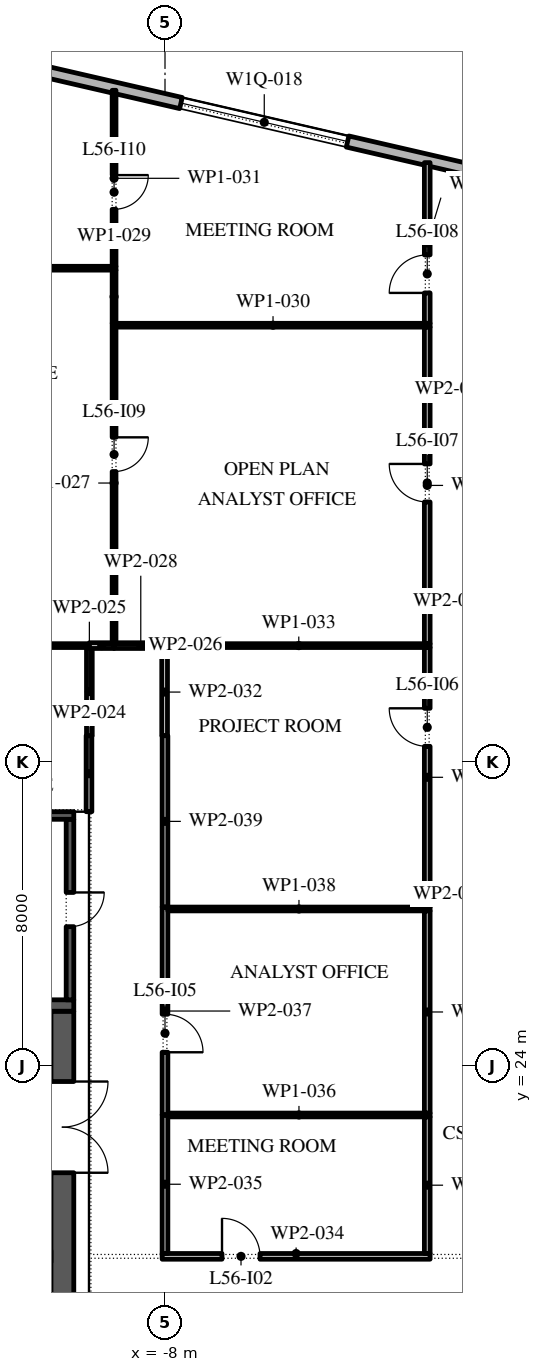
"""IFC4 building model, lengths in metres.
Left out: names, types, materials, properties, quantities, classifications, styles, units other than length and angle.
Written with IfcOpenShell. Run it as: python <this file> out.ifc"""

import sys

from ifc_helpers import new_model, si_unit, direction, frame, frame_2d, origin, place, context, subcontext, project, spatial, rectangle, extrude, element, fill, save


model = new_model("IFC4")
c1 = context("Model", 3, precision=1e-05, world=origin(), true_north=direction((0.0, 1.0)))
c2 = subcontext(c1, "Body", "Model", "MODEL_VIEW")
j1 = project(units=[si_unit("LENGTHUNIT", "METRE"), si_unit("PLANEANGLEUNIT", "RADIAN")], contexts=[c1])
p1 = place(None, origin())
s1 = spatial("IfcSite", under=j1, at=p1, CompositionType="ELEMENT")
p2 = place(p1, origin())
s2 = spatial("IfcBuilding", under=s1, at=p2, CompositionType="ELEMENT")
p3 = place(p2, frame((0.0, 0.0, 259.8)))
s3 = spatial("IfcBuildingStorey", under=s2, at=p3, CompositionType="ELEMENT", Elevation=259.8)
p4 = place(p3, frame((29.616, 40.758, 0.0), z_axis=(0.0, 0.0, 1.0), x_axis=(-0.974370532314, 0.224949029246, 0.0)))
e1 = element("IfcWall", 1, at=p4, inside=s3, PredefinedType="STANDARD", context=c2, shape_type="SweptSolid", body=[
    extrude(rectangle(XDim=48.0, YDim=0.3, at=frame_2d((24.0, 0.0))), origin(), (0.0, 0.0, 1.0), 4.0),
])
p5 = place(p4, frame((1.625, 0.0, 0.45)))
e2 = element("IfcOpeningElement", 2, at=p5, cuts=e1, PredefinedType="OPENING", context=c2, shape_type="SweptSolid", body=[
    extrude(rectangle(XDim=4.5, YDim=2.65, at=frame_2d((2.25, 1.325))), frame((0.0, 0.16, 0.0), z_axis=(0.0, -1.0, 0.0), x_axis=(1.0, 0.0, 0.0)), (0.0, 0.0, 1.0), 0.32),
])
p6 = place(p4, frame((10.575, 0.0, 0.0)))
e3 = element("IfcOpeningElement", 3, at=p6, cuts=e1, PredefinedType="OPENING", context=c2, shape_type="SweptSolid", body=[
    extrude(rectangle(XDim=2.4, YDim=3.5, at=frame_2d((1.2, 1.75))), frame((0.0, 0.16, 0.0), z_axis=(0.0, -1.0, 0.0), x_axis=(1.0, 0.0, 0.0)), (0.0, 0.0, 1.0), 0.32),
])
p7 = place(p4, frame((17.575, 0.0, 0.45)))
e4 = element("IfcOpeningElement", 4, at=p7, cuts=e1, PredefinedType="OPENING", context=c2, shape_type="SweptSolid", body=[
    extrude(rectangle(XDim=4.5, YDim=2.5, at=frame_2d((2.25, 1.25))), frame((0.0, 0.16, 0.0), z_axis=(0.0, -1.0, 0.0), x_axis=(1.0, 0.0, 0.0)), (0.0, 0.0, 1.0), 0.32),
])
p8 = place(p4, frame((25.625, 0.0, 0.45)))
e5 = element("IfcOpeningElement", 5, at=p8, cuts=e1, PredefinedType="OPENING", context=c2, shape_type="SweptSolid", body=[
    extrude(rectangle(XDim=4.5, YDim=2.45, at=frame_2d((2.25, 1.225))), frame((0.0, 0.16, 0.0), z_axis=(0.0, -1.0, 0.0), x_axis=(1.0, 0.0, 0.0)), (0.0, 0.0, 1.0), 0.32),
])
p9 = place(p4, frame((33.675, 0.0, 0.45)))
e6 = element("IfcOpeningElement", 6, at=p9, cuts=e1, PredefinedType="OPENING", context=c2, shape_type="SweptSolid", body=[
    extrude(rectangle(XDim=4.5, YDim=2.45, at=frame_2d((2.25, 1.225))), frame((0.0, 0.16, 0.0), z_axis=(0.0, -1.0, 0.0), x_axis=(1.0, 0.0, 0.0)), (0.0, 0.0, 1.0), 0.32),
])
p10 = place(p4, frame((42.775, 0.0, 0.0)))
e7 = element("IfcOpeningElement", 7, at=p10, cuts=e1, PredefinedType="OPENING", context=c2, shape_type="SweptSolid", body=[
    extrude(rectangle(XDim=2.4, YDim=3.5, at=frame_2d((1.2, 1.75))), frame((0.0, 0.16, 0.0), z_axis=(0.0, -1.0, 0.0), x_axis=(1.0, 0.0, 0.0)), (0.0, 0.0, 1.0), 0.32),
])
p11 = place(p3, frame((-10.7, -2.45, 0.0), z_axis=(0.0, 0.0, 1.0), x_axis=(0.0, 1.0, 0.0)))
e8 = element("IfcWall", 8, at=p11, inside=s3, PredefinedType="SHEAR", context=c2, shape_type="SweptSolid", body=[
    extrude(rectangle(XDim=27.9, YDim=0.6, at=frame_2d((13.95, 0.0))), origin(), (0.0, 0.0, 1.0), 4.0),
])
p12 = place(p11, frame((23.65, 0.0, 0.0)))
e9 = element("IfcOpeningElement", 9, at=p12, cuts=e8, PredefinedType="OPENING", context=c2, shape_type="SweptSolid", body=[
    extrude(rectangle(XDim=2.4, YDim=2.1, at=frame_2d((1.2, 1.05))), frame((0.0, 0.31, 0.0), z_axis=(0.0, -1.0, 0.0), x_axis=(1.0, 0.0, 0.0)), (0.0, 0.0, 1.0), 0.62),
])
p13 = place(p11, frame((1.087, 0.0, 0.0)))
e10 = element("IfcOpeningElement", 10, at=p13, cuts=e8, PredefinedType="OPENING", context=c2, shape_type="SweptSolid", body=[
    extrude(rectangle(XDim=0.9, YDim=2.1, at=frame_2d((0.45, 1.05))), frame((0.0, 0.31, 0.0), z_axis=(0.0, -1.0, 0.0), x_axis=(1.0, 0.0, 0.0)), (0.0, 0.0, 1.0), 0.62),
])
p14 = place(p11, frame((4.262, 0.0, 0.0)))
e11 = element("IfcOpeningElement", 11, at=p14, cuts=e8, PredefinedType="OPENING", context=c2, shape_type="SweptSolid", body=[
    extrude(rectangle(XDim=1.0, YDim=2.1, at=frame_2d((0.5, 1.05))), frame((0.0, 0.31, 0.0), z_axis=(0.0, -1.0, 0.0), x_axis=(1.0, 0.0, 0.0)), (0.0, 0.0, 1.0), 0.62),
])
p15 = place(p3, frame((-21.6, 25.6, 0.0), z_axis=(0.0, 0.0, 1.0), x_axis=(1.0, 0.0, 0.0)))
e12 = element("IfcWall", 12, at=p15, inside=s3, PredefinedType="SHEAR", context=c2, shape_type="SweptSolid", body=[
    extrude(rectangle(XDim=11.2, YDim=0.3, at=frame_2d((5.6, 0.0))), origin(), (0.0, 0.0, 1.0), 4.0),
])
p16 = place(p3, frame((-10.5, 25.75, 0.0), z_axis=(0.0, 0.0, 1.0), x_axis=(0.0, 1.0, 0.0)))
e13 = element("IfcWall", 13, at=p16, inside=s3, PredefinedType="SHEAR", context=c2, shape_type="SweptSolid", body=[
    extrude(rectangle(XDim=4.75, YDim=0.2, at=frame_2d((2.375, 0.0))), origin(), (0.0, 0.0, 1.0), 4.0),
])
p17 = place(p16, frame((1.925, 0.0, 0.0)))
e14 = element("IfcOpeningElement", 14, at=p17, cuts=e13, PredefinedType="OPENING", context=c2, shape_type="SweptSolid", body=[
    extrude(rectangle(XDim=0.9, YDim=2.1, at=frame_2d((0.45, 1.05))), frame((0.0, 0.11, 0.0), z_axis=(0.0, -1.0, 0.0), x_axis=(1.0, 0.0, 0.0)), (0.0, 0.0, 1.0), 0.22),
])
p18 = place(p3, frame((-21.6, 30.6, 0.0), z_axis=(0.0, 0.0, 1.0), x_axis=(1.0, 0.0, 0.0)))
e15 = element("IfcWall", 15, at=p18, inside=s3, PredefinedType="SHEAR", context=c2, shape_type="SweptSolid", body=[
    extrude(rectangle(XDim=11.2, YDim=0.2, at=frame_2d((5.6, 0.0))), origin(), (0.0, 0.0, 1.0), 4.0),
])
p19 = place(p3, frame((-17.19, 35.07, 0.0), z_axis=(0.0, 0.0, 1.0), x_axis=(1.0, 0.0, 0.0)))
e16 = element("IfcWall", 16, at=p19, inside=s3, PredefinedType="PARTITIONING", context=c2, shape_type="SweptSolid", body=[
    extrude(rectangle(XDim=7.2, YDim=0.1, at=frame_2d((3.6, 0.0))), origin(), (0.0, 0.0, 1.0), 4.0),
])
p20 = place(p3, frame((-17.14, 45.0, 0.0), z_axis=(0.0, 0.0, 1.0), x_axis=(1.0, 0.0, 0.0)))
e17 = element("IfcWall", 17, at=p20, inside=s3, PredefinedType="PARTITIONING", context=c2, shape_type="SweptSolid", body=[
    extrude(rectangle(XDim=7.85, YDim=0.1, at=frame_2d((3.925, 0.0))), origin(), (0.0, 0.0, 1.0), 4.0),
])
p21 = place(p3, frame((-10.0, 30.7, 0.0), z_axis=(0.0, 0.0, 1.0), x_axis=(0.0, 1.0, 0.0)))
e18 = element("IfcWall", 18, at=p21, inside=s3, PredefinedType="PARTITIONING", context=c2, shape_type="SweptSolid", body=[
    extrude(rectangle(XDim=2.0, YDim=0.15, at=frame_2d((1.0, 0.0))), origin(), (0.0, 0.0, 1.0), 4.0),
])
p22 = place(p3, frame((-9.99, 32.7, 0.0), z_axis=(0.0, 0.0, 1.0), x_axis=(0.0, 1.0, 0.0)))
e19 = element("IfcWall", 19, at=p22, inside=s3, PredefinedType="PARTITIONING", context=c2, shape_type="SweptSolid", body=[
    extrude(rectangle(XDim=2.32, YDim=0.15, at=frame_2d((1.16, 0.0))), origin(), (0.0, 0.0, 1.0), 4.0),
])
p23 = place(p3, frame((-9.99, 35.07, 0.0), z_axis=(0.0, 0.0, 1.0), x_axis=(1.0, 0.0, 0.0)))
e20 = element("IfcWall", 20, at=p23, inside=s3, PredefinedType="PARTITIONING", context=c2, shape_type="SweptSolid", body=[
    extrude(rectangle(XDim=0.65, YDim=0.15, at=frame_2d((0.325, 0.0))), origin(), (0.0, 0.0, 1.0), 4.0),
])
p24 = place(p3, frame((-9.34, 35.145, 0.0), z_axis=(0.0, 0.0, 1.0), x_axis=(0.0, 1.0, 0.0)))
e21 = element("IfcWall", 21, at=p24, inside=s3, PredefinedType="PARTITIONING", context=c2, shape_type="SweptSolid", body=[
    extrude(rectangle(XDim=8.405, YDim=0.1, at=frame_2d((4.203, 0.0))), origin(), (0.0, 0.0, 1.0), 4.0),
])
p25 = place(p24, frame((4.505, 0.0, 0.0)))
e22 = element("IfcOpeningElement", 22, at=p25, cuts=e21, PredefinedType="OPENING", context=c2, shape_type="SweptSolid", body=[
    extrude(rectangle(XDim=0.9, YDim=2.1, at=frame_2d((0.45, 1.05))), frame((0.0, 0.06, 0.0), z_axis=(0.0, -1.0, 0.0), x_axis=(1.0, 0.0, 0.0)), (0.0, 0.0, 1.0), 0.12),
])
p26 = place(p3, frame((-9.34, 35.07, 0.0), z_axis=(0.0, 0.0, 1.0), x_axis=(1.0, 0.0, 0.0)))
e23 = element("IfcWall", 23, at=p26, inside=s3, PredefinedType="PARTITIONING", context=c2, shape_type="SweptSolid", body=[
    extrude(rectangle(XDim=1.405, YDim=0.15, at=frame_2d((0.703, 0.0))), origin(), (0.0, 0.0, 1.0), 4.0),
])
p27 = place(p3, frame((-9.34, 43.55, 0.0), z_axis=(0.0, 0.0, 1.0), x_axis=(0.0, 1.0, 0.0)))
e24 = element("IfcWall", 24, at=p27, inside=s3, PredefinedType="PARTITIONING", context=c2, shape_type="SweptSolid", body=[
    extrude(rectangle(XDim=1.4, YDim=0.1, at=frame_2d((0.7, 0.0))), origin(), (0.0, 0.0, 1.0), 4.0),
])
p28 = place(p3, frame((-9.29, 43.5, 0.0), z_axis=(0.0, 0.0, 1.0), x_axis=(1.0, 0.0, 0.0)))
e25 = element("IfcWall", 25, at=p28, inside=s3, PredefinedType="PARTITIONING", context=c2, shape_type="SweptSolid", body=[
    extrude(rectangle(XDim=8.265, YDim=0.1, at=frame_2d((4.133, 0.0))), origin(), (0.0, 0.0, 1.0), 4.0),
])
p29 = place(p3, frame((-9.34, 45.05, 0.0), z_axis=(0.0, 0.0, 1.0), x_axis=(0.0, 1.0, 0.0)))
e26 = element("IfcWall", 26, at=p29, inside=s3, PredefinedType="PARTITIONING", context=c2, shape_type="SweptSolid", body=[
    extrude(rectangle(XDim=4.631, YDim=0.1, at=frame_2d((2.315, 0.0))), origin(), (0.0, 0.0, 1.0), 4.0),
])
p30 = place(p29, frame((1.5, 0.0, 0.0)))
e27 = element("IfcOpeningElement", 27, at=p30, cuts=e26, PredefinedType="OPENING", context=c2, shape_type="SweptSolid", body=[
    extrude(rectangle(XDim=0.9, YDim=2.1, at=frame_2d((0.45, 1.05))), frame((0.0, 0.06, 0.0), z_axis=(0.0, -1.0, 0.0), x_axis=(1.0, 0.0, 0.0)), (0.0, 0.0, 1.0), 0.12),
])
p31 = place(p3, frame((-8.01, 34.995, 0.0), z_axis=(0.0, 0.0, 1.0), x_axis=(0.0, -1.0, 0.0)))
e28 = element("IfcWall", 28, at=p31, inside=s3, PredefinedType="PARTITIONING", context=c2, shape_type="SweptSolid", body=[
    extrude(rectangle(XDim=2.295, YDim=0.15, at=frame_2d((1.147, 0.0))), origin(), (0.0, 0.0, 1.0), 4.0),
])
p32 = place(p3, frame((-7.935, 35.07, 0.0), z_axis=(0.0, 0.0, 1.0), x_axis=(1.0, 0.0, 0.0)))
e29 = element("IfcWall", 29, at=p32, inside=s3, PredefinedType="PARTITIONING", context=c2, shape_type="SweptSolid", body=[
    extrude(rectangle(XDim=6.91, YDim=0.1, at=frame_2d((3.455, 0.0))), origin(), (0.0, 0.0, 1.0), 4.0),
])
p33 = place(p3, frame((-8.075, 19.0, 0.0), z_axis=(0.0, 0.0, 1.0), x_axis=(1.0, 0.0, 0.0)))
e30 = element("IfcWall", 30, at=p33, inside=s3, PredefinedType="PARTITIONING", context=c2, shape_type="SweptSolid", body=[
    extrude(rectangle(XDim=7.05, YDim=0.15, at=frame_2d((3.525, 0.0))), origin(), (0.0, 0.0, 1.0), 4.0),
])
p34 = place(p33, frame((1.575, 0.0, 0.0)))
e31 = element("IfcOpeningElement", 31, at=p34, cuts=e30, PredefinedType="OPENING", context=c2, shape_type="SweptSolid", body=[
    extrude(rectangle(XDim=1.0, YDim=2.1, at=frame_2d((0.5, 1.05))), frame((0.0, 0.085, 0.0), z_axis=(0.0, -1.0, 0.0), x_axis=(1.0, 0.0, 0.0)), (0.0, 0.0, 1.0), 0.17),
])
p35 = place(p3, frame((-8.0, 22.72, 0.0), z_axis=(0.0, 0.0, 1.0), x_axis=(0.0, -1.0, 0.0)))
e32 = element("IfcWall", 32, at=p35, inside=s3, PredefinedType="PARTITIONING", context=c2, shape_type="SweptSolid", body=[
    extrude(rectangle(XDim=3.645, YDim=0.15, at=frame_2d((1.823, 0.0))), origin(), (0.0, 0.0, 1.0), 4.0),
])
p36 = place(p3, frame((-7.925, 22.72, 0.0), z_axis=(0.0, 0.0, 1.0), x_axis=(1.0, 0.0, 0.0)))
e33 = element("IfcWall", 33, at=p36, inside=s3, PredefinedType="PARTITIONING", context=c2, shape_type="SweptSolid", body=[
    extrude(rectangle(XDim=6.9, YDim=0.1, at=frame_2d((3.45, 0.0))), origin(), (0.0, 0.0, 1.0), 4.0),
])
p37 = place(p3, frame((-8.0, 28.19, 0.0), z_axis=(0.0, 0.0, 1.0), x_axis=(0.0, -1.0, 0.0)))
e34 = element("IfcWall", 34, at=p37, inside=s3, PredefinedType="PARTITIONING", context=c2, shape_type="SweptSolid", body=[
    extrude(rectangle(XDim=5.47, YDim=0.15, at=frame_2d((2.735, 0.0))), origin(), (0.0, 0.0, 1.0), 4.0),
])
p38 = place(p37, frame((2.82, 0.0, 0.0)))
e35 = element("IfcOpeningElement", 35, at=p38, cuts=e34, PredefinedType="OPENING", context=c2, shape_type="SweptSolid", body=[
    extrude(rectangle(XDim=1.0, YDim=2.1, at=frame_2d((0.5, 1.05))), frame((0.0, 0.085, 0.0), z_axis=(0.0, -1.0, 0.0), x_axis=(1.0, 0.0, 0.0)), (0.0, 0.0, 1.0), 0.17),
])
p39 = place(p3, frame((-7.925, 28.14, 0.0), z_axis=(0.0, 0.0, 1.0), x_axis=(1.0, 0.0, 0.0)))
e36 = element("IfcWall", 36, at=p39, inside=s3, PredefinedType="PARTITIONING", context=c2, shape_type="SweptSolid", body=[
    extrude(rectangle(XDim=6.9, YDim=0.1, at=frame_2d((3.45, 0.0))), origin(), (0.0, 0.0, 1.0), 4.0),
])
p40 = place(p3, frame((-8.0, 32.7, 0.0), z_axis=(0.0, 0.0, 1.0), x_axis=(0.0, -1.0, 0.0)))
e37 = element("IfcWall", 37, at=p40, inside=s3, PredefinedType="PARTITIONING", context=c2, shape_type="SweptSolid", body=[
    extrude(rectangle(XDim=4.51, YDim=0.15, at=frame_2d((2.255, 0.0))), origin(), (0.0, 0.0, 1.0), 4.0),
])
p41 = place(p3, frame((-1.1, 19.075, 0.0), z_axis=(0.0, 0.0, 1.0), x_axis=(0.0, 1.0, 0.0)))
e38 = element("IfcWall", 38, at=p41, inside=s3, PredefinedType="PARTITIONING", context=c2, shape_type="SweptSolid", body=[
    extrude(rectangle(XDim=3.595, YDim=0.15, at=frame_2d((1.797, 0.0))), origin(), (0.0, 0.0, 1.0), 4.0),
])
p42 = place(p3, frame((-1.1, 22.77, 0.0), z_axis=(0.0, 0.0, 1.0), x_axis=(0.0, 1.0, 0.0)))
e39 = element("IfcWall", 39, at=p42, inside=s3, PredefinedType="PARTITIONING", context=c2, shape_type="SweptSolid", body=[
    extrude(rectangle(XDim=5.32, YDim=0.15, at=frame_2d((2.66, 0.0))), origin(), (0.0, 0.0, 1.0), 4.0),
])
p43 = place(p3, frame((-1.1, 28.19, 0.0), z_axis=(0.0, 0.0, 1.0), x_axis=(0.0, 1.0, 0.0)))
e40 = element("IfcWall", 40, at=p43, inside=s3, PredefinedType="PARTITIONING", context=c2, shape_type="SweptSolid", body=[
    extrude(rectangle(XDim=6.83, YDim=0.15, at=frame_2d((3.415, 0.0))), origin(), (0.0, 0.0, 1.0), 4.0),
])
p44 = place(p43, frame((4.23, 0.0, 0.0)))
e41 = element("IfcOpeningElement", 41, at=p44, cuts=e40, PredefinedType="OPENING", context=c2, shape_type="SweptSolid", body=[
    extrude(rectangle(XDim=1.0, YDim=2.1, at=frame_2d((0.5, 1.05))), frame((0.0, 0.085, 0.0), z_axis=(0.0, -1.0, 0.0), x_axis=(1.0, 0.0, 0.0)), (0.0, 0.0, 1.0), 0.17),
])
p45 = place(p3, frame((-1.1, 35.12, 0.0), z_axis=(0.0, 0.0, 1.0), x_axis=(0.0, 1.0, 0.0)))
e42 = element("IfcWall", 42, at=p45, inside=s3, PredefinedType="PARTITIONING", context=c2, shape_type="SweptSolid", body=[
    extrude(rectangle(XDim=8.33, YDim=0.15, at=frame_2d((4.165, 0.0))), origin(), (0.0, 0.0, 1.0), 4.0),
])
p46 = place(p45, frame((3.73, 0.0, 0.0)))
e43 = element("IfcOpeningElement", 43, at=p46, cuts=e42, PredefinedType="OPENING", context=c2, shape_type="SweptSolid", body=[
    extrude(rectangle(XDim=1.0, YDim=2.1, at=frame_2d((0.5, 1.05))), frame((0.0, 0.085, 0.0), z_axis=(0.0, -1.0, 0.0), x_axis=(1.0, 0.0, 0.0)), (0.0, 0.0, 1.0), 0.17),
])
p47 = place(p3, frame((-1.1, 43.55, 0.0), z_axis=(0.0, 0.0, 1.0), x_axis=(0.0, 1.0, 0.0)))
e44 = element("IfcWall", 44, at=p47, inside=s3, PredefinedType="PARTITIONING", context=c2, shape_type="SweptSolid", body=[
    extrude(rectangle(XDim=4.228, YDim=0.15, at=frame_2d((2.114, 0.0))), origin(), (0.0, 0.0, 1.0), 4.0),
])
p48 = place(p47, frame((0.8, 0.0, 0.0)))
e45 = element("IfcOpeningElement", 45, at=p48, cuts=e44, PredefinedType="OPENING", context=c2, shape_type="SweptSolid", body=[
    extrude(rectangle(XDim=1.0, YDim=2.1, at=frame_2d((0.5, 1.05))), frame((0.0, 0.085, 0.0), z_axis=(0.0, -1.0, 0.0), x_axis=(1.0, 0.0, 0.0)), (0.0, 0.0, 1.0), 0.17),
])
p49 = place(p9, origin())
e46 = element("IfcWindow", 46, at=p49, inside=s3, PartitioningType="DOUBLE_PANEL_VERTICAL", PredefinedType="WINDOW", context=c2, shape_type="SweptSolid", body=[
    extrude(rectangle(XDim=4.5, YDim=2.45, at=frame_2d((2.25, 1.225))), frame((0.0, 0.03, 0.0), z_axis=(0.0, -1.0, 0.0), x_axis=(1.0, 0.0, 0.0)), (0.0, 0.0, 1.0), 0.06),
])
fill(e6, e46)
p50 = place(p12, frame((2.4, 0.0, 0.0), z_axis=(0.0, 0.0, 1.0), x_axis=(-1.0, 0.0, 0.0)))
e47 = element("IfcDoor", 47, at=p50, inside=s3, OperationType="DOUBLE_DOOR_SINGLE_SWING", PredefinedType="DOOR", context=c2, shape_type="SweptSolid", body=[
    extrude(rectangle(XDim=2.4, YDim=2.1, at=frame_2d((1.2, 1.05))), frame((0.0, 0.025, 0.0), z_axis=(0.0, -1.0, 0.0), x_axis=(1.0, 0.0, 0.0)), (0.0, 0.0, 1.0), 0.05),
])
fill(e9, e47)
p51 = place(p17, frame((0.9, 0.15, 0.0), z_axis=(0.0, 0.0, 1.0), x_axis=(-1.0, 0.0, 0.0)))
e48 = element("IfcDoor", 48, at=p51, inside=s3, OperationType="SINGLE_SWING_RIGHT", PredefinedType="DOOR", context=c2, shape_type="SweptSolid", body=[
    extrude(rectangle(XDim=0.9, YDim=2.1, at=frame_2d((0.45, 1.05))), frame((0.0, 0.1, 0.0), z_axis=(0.0, -1.0, 0.0), x_axis=(1.0, 0.0, 0.0)), (0.0, 0.0, 1.0), 0.05),
])
fill(e14, e48)
p52 = place(p34, origin())
e49 = element("IfcDoor", 49, at=p52, inside=s3, OperationType="SINGLE_SWING_RIGHT", PredefinedType="DOOR", context=c2, shape_type="SweptSolid", body=[
    extrude(rectangle(XDim=1.0, YDim=2.1, at=frame_2d((0.5, 1.05))), frame((0.0, 0.025, 0.0), z_axis=(0.0, -1.0, 0.0), x_axis=(1.0, 0.0, 0.0)), (0.0, 0.0, 1.0), 0.05),
])
fill(e31, e49)
p53 = place(p38, origin())
e50 = element("IfcDoor", 50, at=p53, inside=s3, OperationType="SINGLE_SWING_LEFT", PredefinedType="DOOR", context=c2, shape_type="SweptSolid", body=[
    extrude(rectangle(XDim=1.0, YDim=2.1, at=frame_2d((0.5, 1.05))), frame((0.0, 0.025, 0.0), z_axis=(0.0, -1.0, 0.0), x_axis=(1.0, 0.0, 0.0)), (0.0, 0.0, 1.0), 0.05),
])
fill(e35, e50)
p54 = place(p44, origin())
e51 = element("IfcDoor", 51, at=p54, inside=s3, OperationType="SINGLE_SWING_LEFT", PredefinedType="DOOR", context=c2, shape_type="SweptSolid", body=[
    extrude(rectangle(XDim=1.0, YDim=2.1, at=frame_2d((0.5, 1.05))), frame((0.0, 0.025, 0.0), z_axis=(0.0, -1.0, 0.0), x_axis=(1.0, 0.0, 0.0)), (0.0, 0.0, 1.0), 0.05),
])
fill(e41, e51)
p55 = place(p46, origin())
e52 = element("IfcDoor", 52, at=p55, inside=s3, OperationType="SINGLE_SWING_LEFT", PredefinedType="DOOR", context=c2, shape_type="SweptSolid", body=[
    extrude(rectangle(XDim=1.0, YDim=2.1, at=frame_2d((0.5, 1.05))), frame((0.0, 0.025, 0.0), z_axis=(0.0, -1.0, 0.0), x_axis=(1.0, 0.0, 0.0)), (0.0, 0.0, 1.0), 0.05),
])
fill(e43, e52)
p56 = place(p48, origin())
e53 = element("IfcDoor", 53, at=p56, inside=s3, OperationType="SINGLE_SWING_RIGHT", PredefinedType="DOOR", context=c2, shape_type="SweptSolid", body=[
    extrude(rectangle(XDim=1.0, YDim=2.1, at=frame_2d((0.5, 1.05))), frame((0.0, 0.025, 0.0), z_axis=(0.0, -1.0, 0.0), x_axis=(1.0, 0.0, 0.0)), (0.0, 0.0, 1.0), 0.05),
])
fill(e45, e53)
p57 = place(p25, frame((0.9, 0.0, 0.0), z_axis=(0.0, 0.0, 1.0), x_axis=(-1.0, 0.0, 0.0)))
e54 = element("IfcDoor", 54, at=p57, inside=s3, OperationType="SINGLE_SWING_RIGHT", PredefinedType="DOOR", context=c2, shape_type="SweptSolid", body=[
    extrude(rectangle(XDim=0.9, YDim=2.1, at=frame_2d((0.45, 1.05))), frame((0.0, 0.025, 0.0), z_axis=(0.0, -1.0, 0.0), x_axis=(1.0, 0.0, 0.0)), (0.0, 0.0, 1.0), 0.05),
])
fill(e22, e54)
p58 = place(p30, frame((0.9, 0.0, 0.0), z_axis=(0.0, 0.0, 1.0), x_axis=(-1.0, 0.0, 0.0)))
e55 = element("IfcDoor", 55, at=p58, inside=s3, OperationType="SINGLE_SWING_RIGHT", PredefinedType="DOOR", context=c2, shape_type="SweptSolid", body=[
    extrude(rectangle(XDim=0.9, YDim=2.1, at=frame_2d((0.45, 1.05))), frame((0.0, 0.025, 0.0), z_axis=(0.0, -1.0, 0.0), x_axis=(1.0, 0.0, 0.0)), (0.0, 0.0, 1.0), 0.05),
])
fill(e27, e55)
save(model, sys.argv[1])
